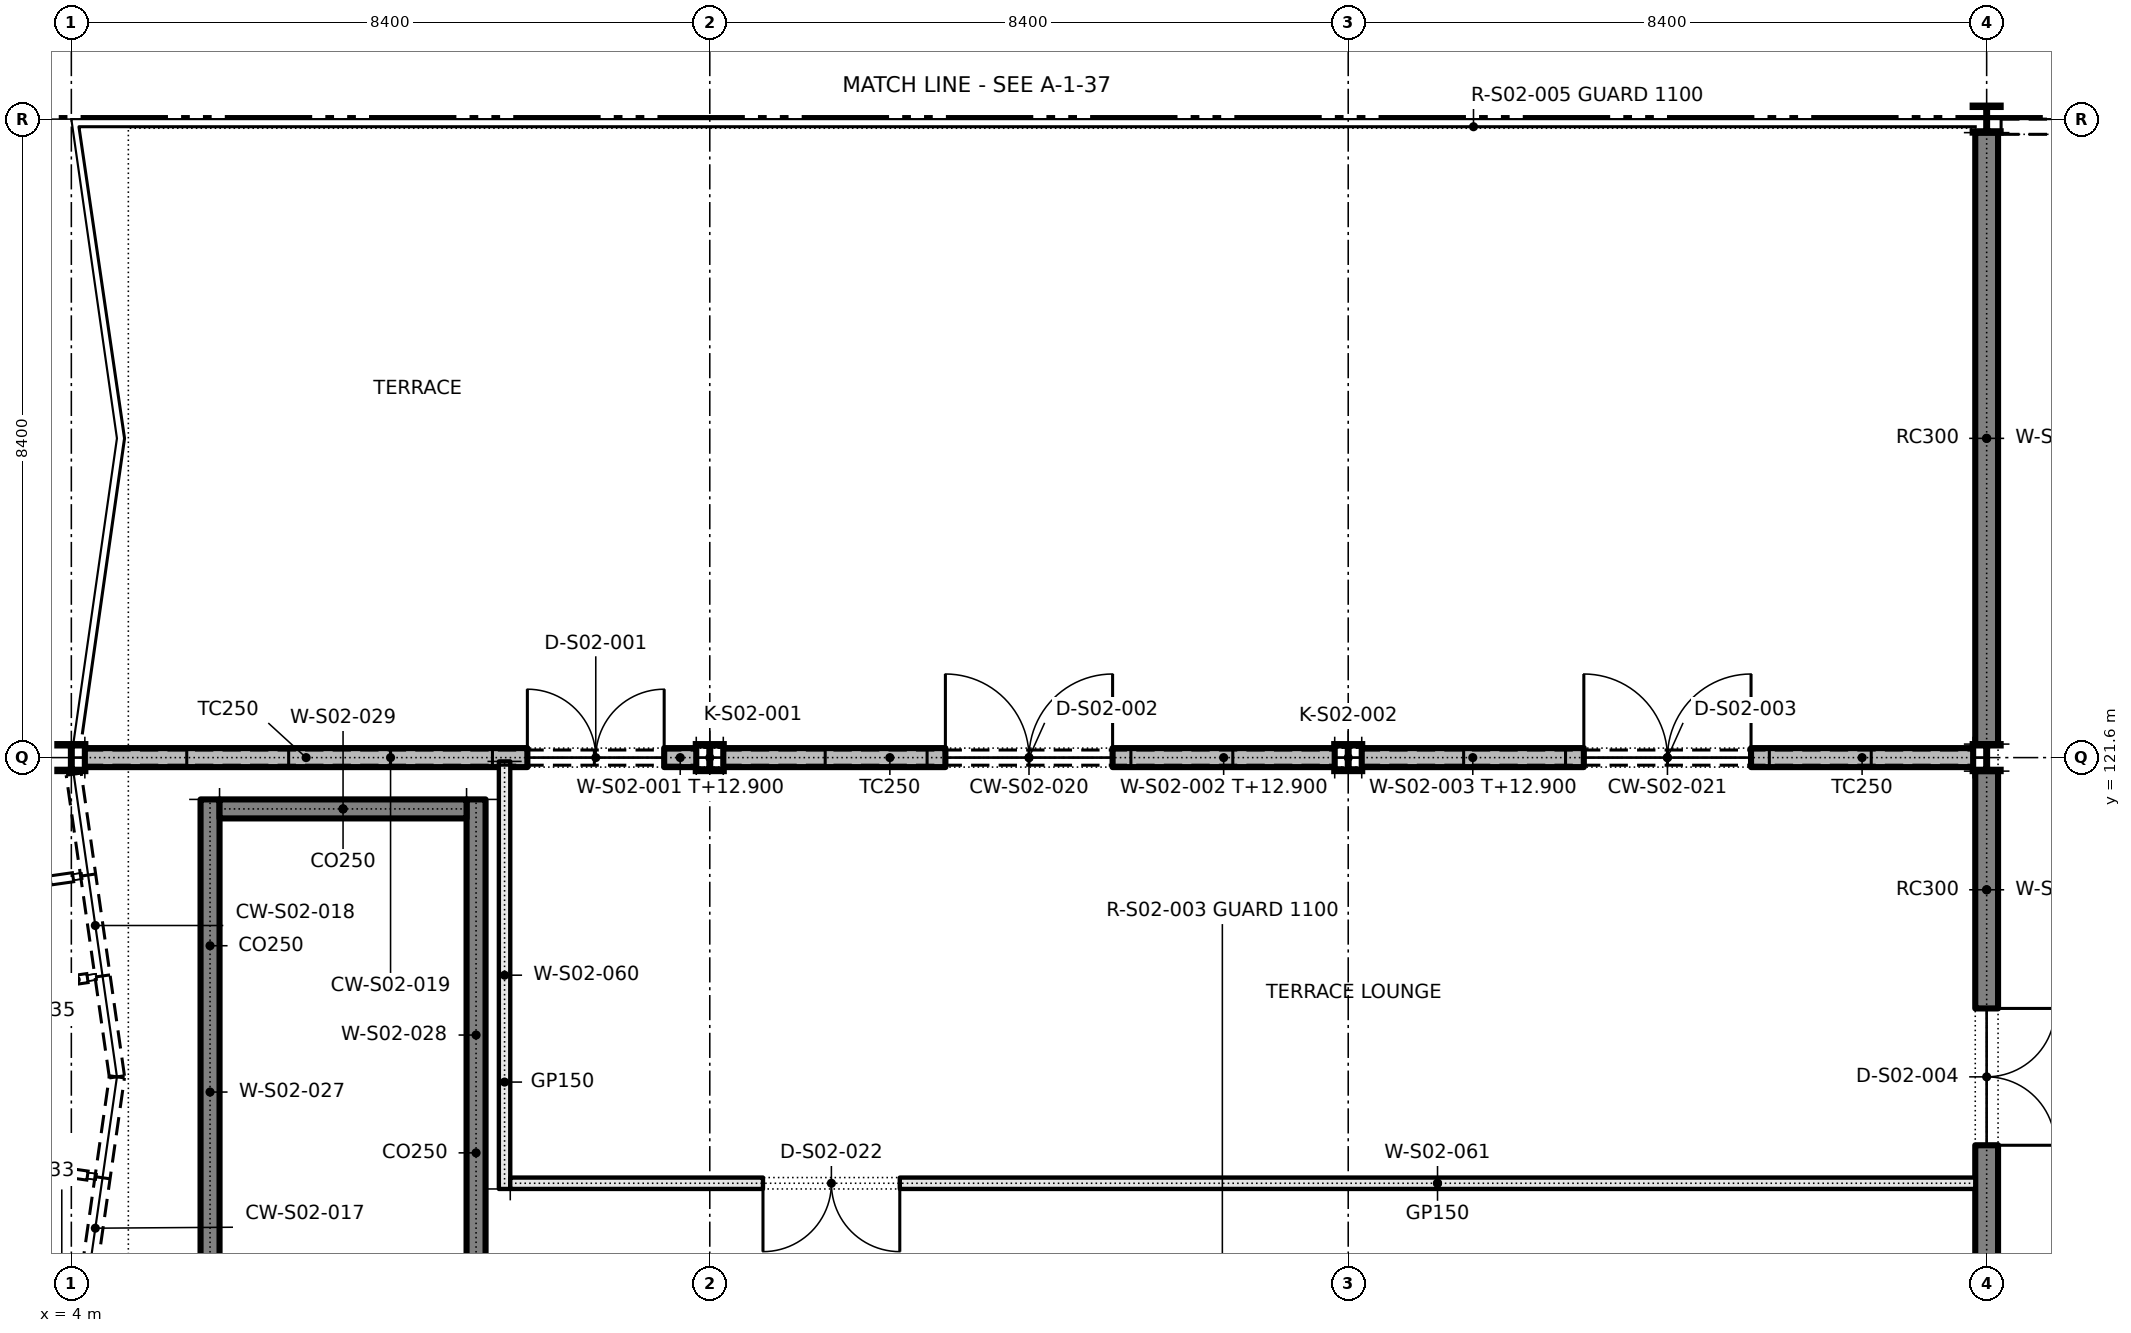
"""IFC4 building model, lengths in metres.
Left out: names, types, materials, properties, quantities, classifications, styles, units other than length and angle.
Written with IfcOpenShell. Run it as: python <this file> out.ifc"""

import sys

from ifc_helpers import new_model, si_unit, direction, frame, frame_2d, origin, origin_2d, place, context, subcontext, project, spatial, rectangle, i_section, extrude, element, fill, save


model = new_model("IFC4")
c1 = context("Model", 3, precision=1e-05, world=origin(), true_north=direction((0.0, 1.0)))
c2 = subcontext(c1, "Body", "Model", "MODEL_VIEW")
j1 = project(units=[si_unit("LENGTHUNIT", "METRE"), si_unit("PLANEANGLEUNIT", "RADIAN")], contexts=[c1])
p1 = place(None, origin())
s1 = spatial("IfcSite", under=j1, at=p1, CompositionType="ELEMENT")
p2 = place(p1, origin())
s2 = spatial("IfcBuilding", under=s1, at=p2, CompositionType="ELEMENT")
p3 = place(p2, frame((0.0, 0.0, 10.2)))
s3 = spatial("IfcBuildingStorey", under=s2, at=p3, CompositionType="ELEMENT", Elevation=10.2)
for number, where, z_axis, x_axis in (
    (1, (4.0, 121.6, 0.0), (0.0, 0.0, 1.0), (1.0, 0.0, 0.0)),
    (2, (12.4, 121.6, 0.0), (0.0, 0.0, 1.0), (1.0, 0.0, 0.0)),
    (3, (20.8, 121.6, 0.0), (0.0, 0.0, 1.0), (1.0, 0.0, 0.0)),
    (4, (29.2, 121.6, 0.0), (0.0, 0.0, 1.0), (1.0, 0.0, 0.0)),
    (5, (29.2, 130.0, 0.0), (0.0, 0.0, 1.0), (1.0, 0.0, 0.0)),
):
    element("IfcColumn", number, at=place(p3, frame(where, z_axis=z_axis, x_axis=x_axis)), inside=s3, PredefinedType="COLUMN", context=c2, shape_type="SweptSolid", body=[
        extrude(i_section(OverallWidth=0.368, OverallDepth=0.356, WebThickness=0.011, FlangeThickness=0.018, FilletRadius=0.015, at=origin_2d()), origin(), (0.0, 0.0, 1.0), 4.8),
    ])
p4 = place(p3, frame((4.178, 121.6, 0.0), z_axis=(0.0, 0.0, 1.0), x_axis=(1.0, 0.0, 0.0)))
e6 = element("IfcWall", 6, at=p4, inside=s3, PredefinedType="SOLIDWALL", context=c2, shape_type="SweptSolid", body=[
    extrude(rectangle(XDim=8.044, YDim=0.25, at=frame_2d((4.022, 0.0))), origin(), (0.0, 0.0, 1.0), 2.7),
])
p5 = place(p4, frame((5.822, 0.0, 0.0)))
e7 = element("IfcOpeningElement", 7, at=p5, cuts=e6, PredefinedType="OPENING", context=c2, shape_type="SweptSolid", body=[
    extrude(rectangle(XDim=1.8, YDim=2.4, at=frame_2d((0.9, 1.2))), frame((0.0, 0.135, 0.0), z_axis=(0.0, -1.0, 0.0), x_axis=(1.0, 0.0, 0.0)), (0.0, 0.0, 1.0), 0.27),
])
p6 = place(p3, frame((12.578, 121.6, 0.0), z_axis=(0.0, 0.0, 1.0), x_axis=(1.0, 0.0, 0.0)))
e8 = element("IfcWall", 8, at=p6, inside=s3, PredefinedType="SOLIDWALL", context=c2, shape_type="SweptSolid", body=[
    extrude(rectangle(XDim=8.044, YDim=0.25, at=frame_2d((4.022, 0.0))), origin(), (0.0, 0.0, 1.0), 2.7),
])
p7 = place(p6, frame((2.922, 0.0, 0.0)))
e9 = element("IfcOpeningElement", 9, at=p7, cuts=e8, PredefinedType="OPENING", context=c2, shape_type="SweptSolid", body=[
    extrude(rectangle(XDim=2.2, YDim=2.4, at=frame_2d((1.1, 1.2))), frame((0.0, 0.135, 0.0), z_axis=(0.0, -1.0, 0.0), x_axis=(1.0, 0.0, 0.0)), (0.0, 0.0, 1.0), 0.27),
])
p8 = place(p3, frame((20.978, 121.6, 0.0), z_axis=(0.0, 0.0, 1.0), x_axis=(1.0, 0.0, 0.0)))
e10 = element("IfcWall", 10, at=p8, inside=s3, PredefinedType="SOLIDWALL", context=c2, shape_type="SweptSolid", body=[
    extrude(rectangle(XDim=8.044, YDim=0.25, at=frame_2d((4.022, 0.0))), origin(), (0.0, 0.0, 1.0), 2.7),
])
p9 = place(p8, frame((2.922, 0.0, 0.0)))
e11 = element("IfcOpeningElement", 11, at=p9, cuts=e10, PredefinedType="OPENING", context=c2, shape_type="SweptSolid", body=[
    extrude(rectangle(XDim=2.2, YDim=2.4, at=frame_2d((1.1, 1.2))), frame((0.0, 0.135, 0.0), z_axis=(0.0, -1.0, 0.0), x_axis=(1.0, 0.0, 0.0)), (0.0, 0.0, 1.0), 0.27),
])
p10 = place(p3, frame((29.2, 113.378, 0.0), z_axis=(0.0, 0.0, 1.0), x_axis=(0.0, 1.0, 0.0)))
e12 = element("IfcWall", 12, at=p10, inside=s3, PredefinedType="SOLIDWALL", context=c2, shape_type="SweptSolid", body=[
    extrude(rectangle(XDim=8.044, YDim=0.3, at=frame_2d((4.022, 0.0))), origin(), (0.0, 0.0, 1.0), 4.8),
])
p11 = place(p10, frame((3.122, 0.0, 0.0)))
e13 = element("IfcOpeningElement", 13, at=p11, cuts=e12, PredefinedType="OPENING", context=c2, shape_type="SweptSolid", body=[
    extrude(rectangle(XDim=1.8, YDim=2.4, at=frame_2d((0.9, 1.2))), frame((0.0, 0.16, 0.0), z_axis=(0.0, -1.0, 0.0), x_axis=(1.0, 0.0, 0.0)), (0.0, 0.0, 1.0), 0.32),
])
p12 = place(p3, frame((29.2, 121.778, 0.0), z_axis=(0.0, 0.0, 1.0), x_axis=(0.0, 1.0, 0.0)))
e14 = element("IfcWall", 14, at=p12, inside=s3, PredefinedType="SOLIDWALL", context=c2, shape_type="SweptSolid", body=[
    extrude(rectangle(XDim=8.044, YDim=0.3, at=frame_2d((4.022, 0.0))), origin(), (0.0, 0.0, 1.0), 4.8),
])
p13 = place(p3, frame((5.825, 113.35, 0.0), z_axis=(0.0, 0.0, 1.0), x_axis=(0.0, 1.0, 0.0)))
e15 = element("IfcWall", 15, at=p13, inside=s3, PredefinedType="SHEAR", context=c2, shape_type="SweptSolid", body=[
    extrude(rectangle(XDim=7.7, YDim=0.25, at=frame_2d((3.85, 0.0))), origin(), (0.0, 0.0, 1.0), 4.8),
])
p14 = place(p3, frame((9.325, 113.35, 0.0), z_axis=(0.0, 0.0, 1.0), x_axis=(0.0, 1.0, 0.0)))
e16 = element("IfcWall", 16, at=p14, inside=s3, PredefinedType="SHEAR", context=c2, shape_type="SweptSolid", body=[
    extrude(rectangle(XDim=7.7, YDim=0.25, at=frame_2d((3.85, 0.0))), origin(), (0.0, 0.0, 1.0), 4.8),
])
p15 = place(p14, frame((0.4, 0.0, 0.0)))
e17 = element("IfcOpeningElement", 17, at=p15, cuts=e16, PredefinedType="OPENING", context=c2, shape_type="SweptSolid", body=[
    extrude(rectangle(XDim=1.1, YDim=2.1, at=frame_2d((0.55, 1.05))), frame((0.0, 0.135, 0.0), z_axis=(0.0, -1.0, 0.0), x_axis=(1.0, 0.0, 0.0)), (0.0, 0.0, 1.0), 0.27),
])
p16 = place(p3, frame((5.95, 120.925, 0.0), z_axis=(0.0, 0.0, 1.0), x_axis=(1.0, 0.0, 0.0)))
e18 = element("IfcWall", 18, at=p16, inside=s3, PredefinedType="SHEAR", context=c2, shape_type="SweptSolid", body=[
    extrude(rectangle(XDim=3.25, YDim=0.25, at=frame_2d((1.625, 0.0))), origin(), (0.0, 0.0, 1.0), 4.8),
])
p17 = place(p3, frame((9.7, 115.925, 0.0), z_axis=(0.0, 0.0, 1.0), x_axis=(0.0, 1.0, 0.0)))
e19 = element("IfcWall", 19, at=p17, inside=s3, PredefinedType="PARTITIONING", context=c2, shape_type="SweptSolid", body=[
    extrude(rectangle(XDim=5.625, YDim=0.15, at=frame_2d((2.812, 0.0))), origin(), (0.0, 0.0, 1.0), 4.8),
])
p18 = place(p3, frame((9.775, 116.0, 0.0), z_axis=(0.0, 0.0, 1.0), x_axis=(1.0, 0.0, 0.0)))
e20 = element("IfcWall", 20, at=p18, inside=s3, PredefinedType="PARTITIONING", context=c2, shape_type="SweptSolid", body=[
    extrude(rectangle(XDim=19.275, YDim=0.15, at=frame_2d((9.638, 0.0))), origin(), (0.0, 0.0, 1.0), 4.8),
])
p19 = place(p18, frame((3.325, 0.0, 0.0)))
e21 = element("IfcOpeningElement", 21, at=p19, cuts=e20, PredefinedType="OPENING", context=c2, shape_type="SweptSolid", body=[
    extrude(rectangle(XDim=1.8, YDim=2.1, at=frame_2d((0.9, 1.05))), frame((0.0, 0.085, 0.0), z_axis=(0.0, -1.0, 0.0), x_axis=(1.0, 0.0, 0.0)), (0.0, 0.0, 1.0), 0.17),
])
p20 = place(p5, origin())
e22 = element("IfcDoor", 22, at=p20, inside=s3, OperationType="DOUBLE_DOOR_SINGLE_SWING", PredefinedType="DOOR", context=c2, shape_type="SweptSolid", body=[
    extrude(rectangle(XDim=1.8, YDim=2.4, at=frame_2d((0.9, 1.2))), frame((0.0, 0.025, 0.0), z_axis=(0.0, -1.0, 0.0), x_axis=(1.0, 0.0, 0.0)), (0.0, 0.0, 1.0), 0.05),
])
fill(e7, e22)
p21 = place(p7, origin())
e23 = element("IfcDoor", 23, at=p21, inside=s3, OperationType="DOUBLE_DOOR_SINGLE_SWING", PredefinedType="DOOR", context=c2, shape_type="SweptSolid", body=[
    extrude(rectangle(XDim=2.2, YDim=2.4, at=frame_2d((1.1, 1.2))), frame((0.0, 0.025, 0.0), z_axis=(0.0, -1.0, 0.0), x_axis=(1.0, 0.0, 0.0)), (0.0, 0.0, 1.0), 0.05),
])
fill(e9, e23)
p22 = place(p9, origin())
e24 = element("IfcDoor", 24, at=p22, inside=s3, OperationType="DOUBLE_DOOR_SINGLE_SWING", PredefinedType="DOOR", context=c2, shape_type="SweptSolid", body=[
    extrude(rectangle(XDim=2.2, YDim=2.4, at=frame_2d((1.1, 1.2))), frame((0.0, 0.025, 0.0), z_axis=(0.0, -1.0, 0.0), x_axis=(1.0, 0.0, 0.0)), (0.0, 0.0, 1.0), 0.05),
])
fill(e11, e24)
p23 = place(p11, frame((1.8, 0.0, 0.0), z_axis=(0.0, 0.0, 1.0), x_axis=(-1.0, 0.0, 0.0)))
e25 = element("IfcDoor", 25, at=p23, inside=s3, OperationType="DOUBLE_DOOR_SINGLE_SWING", PredefinedType="DOOR", context=c2, shape_type="SweptSolid", body=[
    extrude(rectangle(XDim=1.8, YDim=2.4, at=frame_2d((0.9, 1.2))), frame((0.0, 0.025, 0.0), z_axis=(0.0, -1.0, 0.0), x_axis=(1.0, 0.0, 0.0)), (0.0, 0.0, 1.0), 0.05),
])
fill(e13, e25)
p24 = place(p19, frame((1.8, 0.0, 0.0), z_axis=(0.0, 0.0, 1.0), x_axis=(-1.0, 0.0, 0.0)))
e26 = element("IfcDoor", 26, at=p24, inside=s3, OperationType="DOUBLE_DOOR_SINGLE_SWING", PredefinedType="DOOR", context=c2, shape_type="SweptSolid", body=[
    extrude(rectangle(XDim=1.8, YDim=2.1, at=frame_2d((0.9, 1.05))), frame((0.0, 0.025, 0.0), z_axis=(0.0, -1.0, 0.0), x_axis=(1.0, 0.0, 0.0)), (0.0, 0.0, 1.0), 0.05),
])
fill(e21, e26)
save(model, sys.argv[1])
